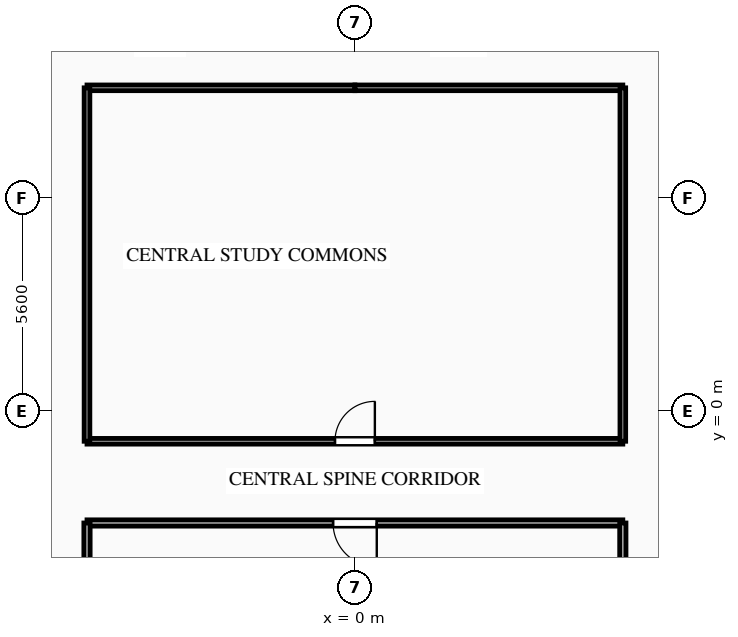
"""IFC4 building model, lengths in metres.
Left out: names, types, materials, properties, quantities, classifications, styles, units other than length and angle.
Written with IfcOpenShell. Run it as: python <this file> out.ifc"""

import sys

from ifc_helpers import new_model, si_unit, direction, frame, frame_2d, origin, place, context, subcontext, project, spatial, rectangle, extrude, element, fill, save


model = new_model("IFC4")
c1 = context("Model", 3, precision=1e-05, world=origin(), true_north=direction((0.0, 1.0)))
c2 = subcontext(c1, "Body", "Model", "MODEL_VIEW")
j1 = project(units=[si_unit("LENGTHUNIT", "METRE"), si_unit("PLANEANGLEUNIT", "RADIAN")], contexts=[c1])
p1 = place(None, origin())
s1 = spatial("IfcSite", under=j1, at=p1, CompositionType="ELEMENT")
p2 = place(p1, origin())
s2 = spatial("IfcBuilding", under=s1, at=p2, CompositionType="ELEMENT")
p3 = place(p2, frame((0.0, 0.0, 206.45)))
s3 = spatial("IfcBuildingStorey", under=s2, at=p3, CompositionType="ELEMENT", Elevation=206.45)
for number, where, z_axis, x_axis in (
    (1, (0.0, 8.5, 0.0), (0.0, 0.0, 1.0), (-1.0, 0.0, 0.0)),
    (2, (7.05, 8.5, 0.0), (0.0, 0.0, 1.0), (-1.0, 0.0, 0.0)),
):
    element("IfcWall", number, at=place(p3, frame(where, z_axis=z_axis, x_axis=x_axis)), inside=s3, PredefinedType="PARTITIONING", context=c2, shape_type="SweptSolid", body=[
        extrude(rectangle(XDim=7.05, YDim=0.15, at=frame_2d((3.525, 0.0))), origin(), (0.0, 0.0, 1.0), 3.04),
    ])
p4 = place(p3, frame((-7.05, -0.8, 0.0), z_axis=(0.0, 0.0, 1.0), x_axis=(1.0, 0.0, 0.0)))
e3 = element("IfcWall", 3, at=p4, inside=s3, PredefinedType="PARTITIONING", context=c2, shape_type="SweptSolid", body=[
    extrude(rectangle(XDim=14.1, YDim=0.15, at=frame_2d((7.05, 0.0))), origin(), (0.0, 0.0, 1.0), 3.04),
])
p5 = place(p4, frame((6.525, 0.0, 0.0)))
e4 = element("IfcOpeningElement", 4, at=p5, cuts=e3, PredefinedType="OPENING", context=c2, shape_type="SweptSolid", body=[
    extrude(rectangle(XDim=1.05, YDim=2.15, at=frame_2d((0.525, 1.075))), frame((0.0, 0.085, 0.0), z_axis=(0.0, -1.0, 0.0), x_axis=(1.0, 0.0, 0.0)), (0.0, 0.0, 1.0), 0.17),
])
p6 = place(p3, frame((7.05, -2.95, 0.0), z_axis=(0.0, 0.0, 1.0), x_axis=(-1.0, 0.0, 0.0)))
e5 = element("IfcWall", 5, at=p6, inside=s3, PredefinedType="PARTITIONING", context=c2, shape_type="SweptSolid", body=[
    extrude(rectangle(XDim=14.1, YDim=0.165, at=frame_2d((7.05, 0.0))), origin(), (0.0, 0.0, 1.0), 3.04),
])
p7 = place(p6, frame((6.475, 0.0, 0.0)))
e6 = element("IfcOpeningElement", 6, at=p7, cuts=e5, PredefinedType="OPENING", context=c2, shape_type="SweptSolid", body=[
    extrude(rectangle(XDim=1.15, YDim=2.15, at=frame_2d((0.575, 1.075))), frame((0.0, 0.093, 0.0), z_axis=(0.0, -1.0, 0.0), x_axis=(1.0, 0.0, 0.0)), (0.0, 0.0, 1.0), 0.185),
])
p8 = place(p3, frame((-7.05, 8.5, 0.0), z_axis=(0.0, 0.0, 1.0), x_axis=(0.0, -1.0, 0.0)))
e7 = element("IfcWall", 7, at=p8, inside=s3, PredefinedType="PARTITIONING", context=c2, shape_type="SweptSolid", body=[
    extrude(rectangle(XDim=9.3, YDim=0.15, at=frame_2d((4.65, 0.0))), origin(), (0.0, 0.0, 1.0), 3.04),
])
p9 = place(p3, frame((-7.05, -2.95, 0.0), z_axis=(0.0, 0.0, 1.0), x_axis=(0.0, -1.0, 0.0)))
e8 = element("IfcWall", 8, at=p9, inside=s3, PredefinedType="PARTITIONING", context=c2, shape_type="SweptSolid", body=[
    extrude(rectangle(XDim=2.65, YDim=0.165, at=frame_2d((1.325, 0.0))), origin(), (0.0, 0.0, 1.0), 3.04),
])
p10 = place(p3, frame((7.05, -0.8, 0.0), z_axis=(0.0, 0.0, 1.0), x_axis=(0.0, 1.0, 0.0)))
e9 = element("IfcWall", 9, at=p10, inside=s3, PredefinedType="PARTITIONING", context=c2, shape_type="SweptSolid", body=[
    extrude(rectangle(XDim=9.3, YDim=0.15, at=frame_2d((4.65, 0.0))), origin(), (0.0, 0.0, 1.0), 3.04),
])
p11 = place(p3, frame((7.05, -5.6, 0.0), z_axis=(0.0, 0.0, 1.0), x_axis=(0.0, 1.0, 0.0)))
e10 = element("IfcWall", 10, at=p11, inside=s3, PredefinedType="PARTITIONING", context=c2, shape_type="SweptSolid", body=[
    extrude(rectangle(XDim=2.65, YDim=0.165, at=frame_2d((1.325, 0.0))), origin(), (0.0, 0.0, 1.0), 3.04),
])
p12 = place(p5, origin())
e11 = element("IfcDoor", 11, at=p12, inside=s3, OperationType="SINGLE_SWING_RIGHT", PredefinedType="DOOR", context=c2, shape_type="SweptSolid", body=[
    extrude(rectangle(XDim=1.05, YDim=2.15, at=frame_2d((0.525, 1.075))), frame((0.0, 0.025, 0.0), z_axis=(0.0, -1.0, 0.0), x_axis=(1.0, 0.0, 0.0)), (0.0, 0.0, 1.0), 0.05),
])
fill(e4, e11)
p13 = place(p7, origin())
e12 = element("IfcDoor", 12, at=p13, inside=s3, OperationType="SINGLE_SWING_LEFT", PredefinedType="DOOR", context=c2, shape_type="SweptSolid", body=[
    extrude(rectangle(XDim=1.15, YDim=2.15, at=frame_2d((0.575, 1.075))), frame((0.0, 0.025, 0.0), z_axis=(0.0, -1.0, 0.0), x_axis=(1.0, 0.0, 0.0)), (0.0, 0.0, 1.0), 0.05),
])
fill(e6, e12)
save(model, sys.argv[1])
